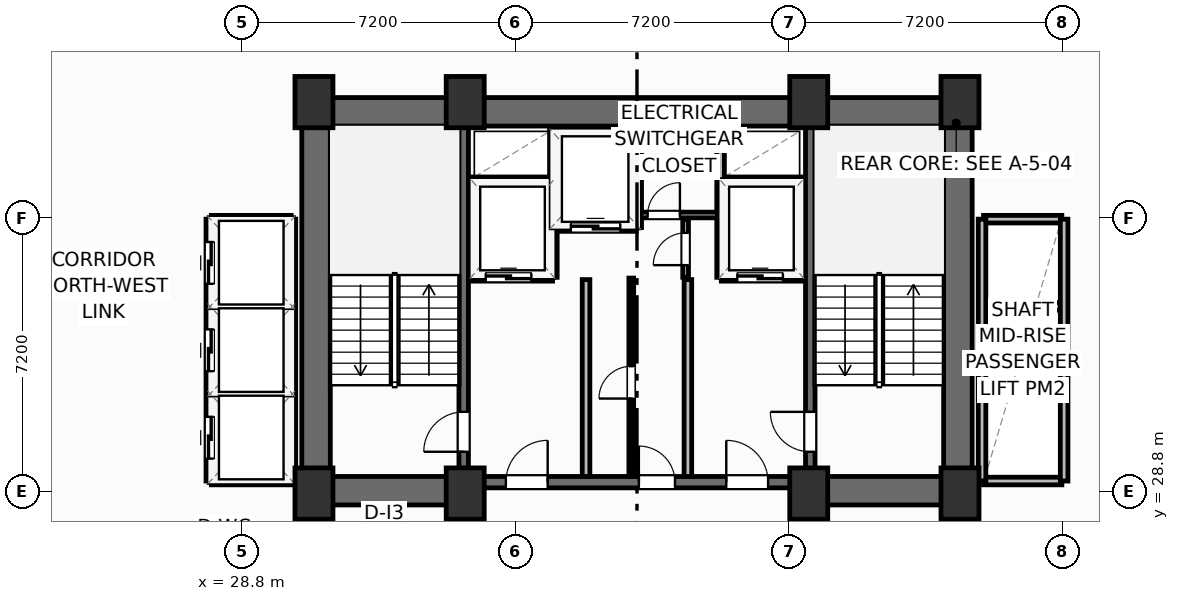
"""IFC4 building model, lengths in metres.
Left out: names, types, materials, properties, quantities, classifications, styles, units other than length and angle.
Written with IfcOpenShell. Run it as: python <this file> out.ifc"""

import sys

from ifc_helpers import new_model, si_unit, direction, frame, frame_2d, origin, origin_2d, place, context, subcontext, project, spatial, rectangle, extrude, element, fill, save


model = new_model("IFC4")
c1 = context("Model", 3, precision=1e-05, world=origin(), true_north=direction((0.0, 1.0)))
c2 = subcontext(c1, "Body", "Model", "MODEL_VIEW")
j1 = project(units=[si_unit("LENGTHUNIT", "METRE"), si_unit("PLANEANGLEUNIT", "RADIAN")], contexts=[c1])
p1 = place(None, origin())
s1 = spatial("IfcSite", under=j1, at=p1, CompositionType="ELEMENT")
p2 = place(p1, origin())
s2 = spatial("IfcBuilding", under=s1, at=p2, CompositionType="ELEMENT")
p3 = place(p2, frame((0.0, 0.0, 83.6)))
s3 = spatial("IfcBuildingStorey", under=s2, at=p3, CompositionType="ELEMENT", Elevation=83.6)
for number, where, z_axis, x_axis in (
    (1, (30.7, 28.75, 0.0), (0.0, 0.0, 1.0), (1.0, 0.0, 0.0)),
    (2, (34.68, 28.75, 0.0), (0.0, 0.0, 1.0), (1.0, 0.0, 0.0)),
    (3, (43.72, 28.75, 0.0), (0.0, 0.0, 1.0), (1.0, 0.0, 0.0)),
    (4, (47.7, 28.75, 0.0), (0.0, 0.0, 1.0), (1.0, 0.0, 0.0)),
    (5, (30.7, 39.05, 0.0), (0.0, 0.0, 1.0), (1.0, 0.0, 0.0)),
    (6, (34.68, 39.05, 0.0), (0.0, 0.0, 1.0), (1.0, 0.0, 0.0)),
    (7, (43.72, 39.05, 0.0), (0.0, 0.0, 1.0), (1.0, 0.0, 0.0)),
    (8, (47.7, 39.05, 0.0), (0.0, 0.0, 1.0), (1.0, 0.0, 0.0)),
):
    element("IfcColumn", number, at=place(p3, frame(where, z_axis=z_axis, x_axis=x_axis)), inside=s3, PredefinedType="COLUMN", context=c2, shape_type="SweptSolid", body=[
        extrude(rectangle(XDim=1.0, YDim=1.35, at=origin_2d()), origin(), (0.0, 0.0, 1.0), 3.7),
    ])
p4 = place(p3, frame((30.38, 38.795, 0.0), z_axis=(0.0, 0.0, 1.0), x_axis=(1.0, 0.0, 0.0)))
e9 = element("IfcWall", 9, at=p4, inside=s3, PredefinedType="SHEAR", context=c2, shape_type="SweptSolid", body=[
    extrude(rectangle(XDim=17.64, YDim=0.75, at=frame_2d((8.82, 0.0))), origin(), (0.0, 0.0, 1.0), 3.45),
])
for number, where, z_axis, x_axis in (
    (10, (30.755, 29.2, 0.0), (0.0, 0.0, 1.0), (0.0, 1.0, 0.0)),
    (11, (47.645, 29.2, 0.0), (0.0, 0.0, 1.0), (0.0, 1.0, 0.0)),
):
    element("IfcWall", number, at=place(p3, frame(where, z_axis=z_axis, x_axis=x_axis)), inside=s3, PredefinedType="SHEAR", context=c2, shape_type="SweptSolid", body=[
        extrude(rectangle(XDim=9.22, YDim=0.75, at=frame_2d((4.61, 0.0))), origin(), (0.0, 0.0, 1.0), 3.45),
    ])
p5 = place(p3, frame((30.38, 28.825, 0.0), z_axis=(0.0, 0.0, 1.0), x_axis=(1.0, 0.0, 0.0)))
e12 = element("IfcWall", 12, at=p5, inside=s3, PredefinedType="SHEAR", context=c2, shape_type="SweptSolid", body=[
    extrude(rectangle(XDim=4.42, YDim=0.75, at=frame_2d((2.21, 0.0))), origin(), (0.0, 0.0, 1.0), 3.45),
])
p6 = place(p3, frame((43.6, 28.825, 0.0), z_axis=(0.0, 0.0, 1.0), x_axis=(1.0, 0.0, 0.0)))
e13 = element("IfcWall", 13, at=p6, inside=s3, PredefinedType="SHEAR", context=c2, shape_type="SweptSolid", body=[
    extrude(rectangle(XDim=4.42, YDim=0.75, at=frame_2d((2.21, 0.0))), origin(), (0.0, 0.0, 1.0), 3.45),
])
p7 = place(p3, frame((34.8, 29.05, 0.0), z_axis=(0.0, 0.0, 1.0), x_axis=(1.0, 0.0, 0.0)))
e14 = element("IfcWall", 14, at=p7, inside=s3, PredefinedType="SHEAR", context=c2, shape_type="SweptSolid", body=[
    extrude(rectangle(XDim=8.8, YDim=0.3, at=frame_2d((4.4, 0.0))), origin(), (0.0, 0.0, 1.0), 3.45),
])
p8 = place(p7, frame((0.95, 0.0, 0.0)))
e15 = element("IfcOpeningElement", 15, at=p8, cuts=e14, PredefinedType="OPENING", context=c2, shape_type="SweptSolid", body=[
    extrude(rectangle(XDim=1.1, YDim=2.15, at=frame_2d((0.55, 1.075))), frame((0.0, 0.16, 0.0), z_axis=(0.0, -1.0, 0.0), x_axis=(1.0, 0.0, 0.0)), (0.0, 0.0, 1.0), 0.32),
])
p9 = place(p7, frame((6.75, 0.0, 0.0)))
e16 = element("IfcOpeningElement", 16, at=p9, cuts=e14, PredefinedType="OPENING", context=c2, shape_type="SweptSolid", body=[
    extrude(rectangle(XDim=1.1, YDim=2.15, at=frame_2d((0.55, 1.075))), frame((0.0, 0.16, 0.0), z_axis=(0.0, -1.0, 0.0), x_axis=(1.0, 0.0, 0.0)), (0.0, 0.0, 1.0), 0.32),
])
p10 = place(p7, frame((4.45, 0.0, 0.0)))
e17 = element("IfcOpeningElement", 17, at=p10, cuts=e14, PredefinedType="OPENING", context=c2, shape_type="SweptSolid", body=[
    extrude(rectangle(XDim=0.95, YDim=2.15, at=frame_2d((0.475, 1.075))), frame((0.0, 0.16, 0.0), z_axis=(0.0, -1.0, 0.0), x_axis=(1.0, 0.0, 0.0)), (0.0, 0.0, 1.0), 0.32),
])
p11 = place(p3, frame((34.64, 29.2, 0.0), z_axis=(0.0, 0.0, 1.0), x_axis=(0.0, 1.0, 0.0)))
e18 = element("IfcWall", 18, at=p11, inside=s3, PredefinedType="SHEAR", context=c2, shape_type="SweptSolid", body=[
    extrude(rectangle(XDim=9.22, YDim=0.25, at=frame_2d((4.61, 0.0))), origin(), (0.0, 0.0, 1.0), 3.45),
])
p12 = place(p11, frame((0.65, 0.0, 0.0)))
e19 = element("IfcOpeningElement", 19, at=p12, cuts=e18, PredefinedType="OPENING", context=c2, shape_type="SweptSolid", body=[
    extrude(rectangle(XDim=1.05, YDim=2.15, at=frame_2d((0.525, 1.075))), frame((0.0, 0.135, 0.0), z_axis=(0.0, -1.0, 0.0), x_axis=(1.0, 0.0, 0.0)), (0.0, 0.0, 1.0), 0.27),
])
p13 = place(p3, frame((43.76, 29.2, 0.0), z_axis=(0.0, 0.0, 1.0), x_axis=(0.0, 1.0, 0.0)))
e20 = element("IfcWall", 20, at=p13, inside=s3, PredefinedType="SHEAR", context=c2, shape_type="SweptSolid", body=[
    extrude(rectangle(XDim=9.22, YDim=0.25, at=frame_2d((4.61, 0.0))), origin(), (0.0, 0.0, 1.0), 3.45),
])
p14 = place(p13, frame((0.65, 0.0, 0.0)))
e21 = element("IfcOpeningElement", 21, at=p14, cuts=e20, PredefinedType="OPENING", context=c2, shape_type="SweptSolid", body=[
    extrude(rectangle(XDim=1.05, YDim=2.15, at=frame_2d((0.525, 1.075))), frame((0.0, 0.135, 0.0), z_axis=(0.0, -1.0, 0.0), x_axis=(1.0, 0.0, 0.0)), (0.0, 0.0, 1.0), 0.27),
])
for number, where, z_axis, x_axis in (
    (22, (37.86, 29.2, 0.0), (0.0, 0.0, 1.0), (0.0, 1.0, 0.0)),
    (23, (40.54, 29.2, 0.0), (0.0, 0.0, 1.0), (0.0, 1.0, 0.0)),
):
    element("IfcWall", number, at=place(p3, frame(where, z_axis=z_axis, x_axis=x_axis)), inside=s3, PredefinedType="PARTITIONING", context=c2, shape_type="SweptSolid", body=[
        extrude(rectangle(XDim=5.18, YDim=0.2, at=frame_2d((2.59, 0.0))), origin(), (0.0, 0.0, 1.0), 3.45),
    ])
p15 = place(p3, frame((34.8, 34.44, 0.0), z_axis=(0.0, 0.0, 1.0), x_axis=(1.0, 0.0, 0.0)))
e24 = element("IfcWall", 24, at=p15, inside=s3, PredefinedType="PARTITIONING", context=c2, shape_type="SweptSolid", body=[
    extrude(rectangle(XDim=2.18, YDim=0.2, at=frame_2d((1.09, 0.0))), origin(), (0.0, 0.0, 1.0), 3.45),
])
p16 = place(p15, frame((0.42, 0.0, 0.0)))
e25 = element("IfcOpeningElement", 25, at=p16, cuts=e24, PredefinedType="OPENING", context=c2, shape_type="SweptSolid", body=[
    extrude(rectangle(XDim=1.2, YDim=2.2, at=frame_2d((0.6, 1.1))), frame((0.0, 0.11, 0.0), z_axis=(0.0, -1.0, 0.0), x_axis=(1.0, 0.0, 0.0)), (0.0, 0.0, 1.0), 0.22),
])
p17 = place(p3, frame((34.8, 36.98, 0.0), z_axis=(0.0, 0.0, 1.0), x_axis=(1.0, 0.0, 0.0)))
e26 = element("IfcWall", 26, at=p17, inside=s3, PredefinedType="PARTITIONING", context=c2, shape_type="SweptSolid", body=[
    extrude(rectangle(XDim=2.18, YDim=0.2, at=frame_2d((1.09, 0.0))), origin(), (0.0, 0.0, 1.0), 3.45),
])
p18 = place(p3, frame((37.0, 34.44, 0.0), z_axis=(0.0, 0.0, 1.0), x_axis=(0.0, 1.0, 0.0)))
e27 = element("IfcWall", 27, at=p18, inside=s3, PredefinedType="PARTITIONING", context=c2, shape_type="SweptSolid", body=[
    extrude(rectangle(XDim=3.9, YDim=0.2, at=frame_2d((1.95, 0.0))), origin(), (0.0, 0.0, 1.0), 3.45),
])
p19 = place(p3, frame((41.42, 34.44, 0.0), z_axis=(0.0, 0.0, 1.0), x_axis=(1.0, 0.0, 0.0)))
e28 = element("IfcWall", 28, at=p19, inside=s3, PredefinedType="PARTITIONING", context=c2, shape_type="SweptSolid", body=[
    extrude(rectangle(XDim=2.18, YDim=0.2, at=frame_2d((1.09, 0.0))), origin(), (0.0, 0.0, 1.0), 3.45),
])
p20 = place(p19, frame((0.42, 0.0, 0.0)))
e29 = element("IfcOpeningElement", 29, at=p20, cuts=e28, PredefinedType="OPENING", context=c2, shape_type="SweptSolid", body=[
    extrude(rectangle(XDim=1.2, YDim=2.2, at=frame_2d((0.6, 1.1))), frame((0.0, 0.11, 0.0), z_axis=(0.0, -1.0, 0.0), x_axis=(1.0, 0.0, 0.0)), (0.0, 0.0, 1.0), 0.22),
])
p21 = place(p3, frame((41.42, 36.98, 0.0), z_axis=(0.0, 0.0, 1.0), x_axis=(1.0, 0.0, 0.0)))
e30 = element("IfcWall", 30, at=p21, inside=s3, PredefinedType="PARTITIONING", context=c2, shape_type="SweptSolid", body=[
    extrude(rectangle(XDim=2.18, YDim=0.2, at=frame_2d((1.09, 0.0))), origin(), (0.0, 0.0, 1.0), 3.45),
])
p22 = place(p3, frame((41.4, 34.44, 0.0), z_axis=(0.0, 0.0, 1.0), x_axis=(0.0, 1.0, 0.0)))
e31 = element("IfcWall", 31, at=p22, inside=s3, PredefinedType="PARTITIONING", context=c2, shape_type="SweptSolid", body=[
    extrude(rectangle(XDim=3.9, YDim=0.2, at=frame_2d((1.95, 0.0))), origin(), (0.0, 0.0, 1.0), 3.45),
])
p23 = place(p3, frame((37.06, 35.75, 0.0), z_axis=(0.0, 0.0, 1.0), x_axis=(1.0, 0.0, 0.0)))
e32 = element("IfcWall", 32, at=p23, inside=s3, PredefinedType="PARTITIONING", context=c2, shape_type="SweptSolid", body=[
    extrude(rectangle(XDim=2.12, YDim=0.2, at=frame_2d((1.06, 0.0))), origin(), (0.0, 0.0, 1.0), 3.45),
])
p24 = place(p23, frame((0.4, 0.0, 0.0)))
e33 = element("IfcOpeningElement", 33, at=p24, cuts=e32, PredefinedType="OPENING", context=c2, shape_type="SweptSolid", body=[
    extrude(rectangle(XDim=1.3, YDim=2.2, at=frame_2d((0.65, 1.1))), frame((0.0, 0.11, 0.0), z_axis=(0.0, -1.0, 0.0), x_axis=(1.0, 0.0, 0.0)), (0.0, 0.0, 1.0), 0.22),
])
p25 = place(p3, frame((39.22, 35.75, 0.0), z_axis=(0.0, 0.0, 1.0), x_axis=(0.0, 1.0, 0.0)))
e34 = element("IfcWall", 34, at=p25, inside=s3, PredefinedType="PARTITIONING", context=c2, shape_type="SweptSolid", body=[
    extrude(rectangle(XDim=2.59, YDim=0.2, at=frame_2d((1.295, 0.0))), origin(), (0.0, 0.0, 1.0), 3.45),
])
p26 = place(p3, frame((39.3, 36.08, 0.0), z_axis=(0.0, 0.0, 1.0), x_axis=(1.0, 0.0, 0.0)))
e35 = element("IfcWall", 35, at=p26, inside=s3, PredefinedType="PARTITIONING", context=c2, shape_type="SweptSolid", body=[
    extrude(rectangle(XDim=2.02, YDim=0.15, at=frame_2d((1.01, 0.0))), origin(), (0.0, 0.0, 1.0), 3.45),
])
p27 = place(p26, frame((0.18, 0.0, 0.0)))
e36 = element("IfcOpeningElement", 36, at=p27, cuts=e35, PredefinedType="OPENING", context=c2, shape_type="SweptSolid", body=[
    extrude(rectangle(XDim=0.85, YDim=2.05, at=frame_2d((0.425, 1.025))), frame((0.0, 0.085, 0.0), z_axis=(0.0, -1.0, 0.0), x_axis=(1.0, 0.0, 0.0)), (0.0, 0.0, 1.0), 0.17),
])
p28 = place(p3, frame((40.48, 34.44, 0.0), z_axis=(0.0, 0.0, 1.0), x_axis=(0.0, 1.0, 0.0)))
e37 = element("IfcWall", 37, at=p28, inside=s3, PredefinedType="PARTITIONING", context=c2, shape_type="SweptSolid", body=[
    extrude(rectangle(XDim=1.52, YDim=0.15, at=frame_2d((0.76, 0.0))), origin(), (0.0, 0.0, 1.0), 3.45),
])
p29 = place(p28, frame((0.32, 0.0, 0.0)))
e38 = element("IfcOpeningElement", 38, at=p29, cuts=e37, PredefinedType="OPENING", context=c2, shape_type="SweptSolid", body=[
    extrude(rectangle(XDim=0.85, YDim=2.05, at=frame_2d((0.425, 1.025))), frame((0.0, 0.085, 0.0), z_axis=(0.0, -1.0, 0.0), x_axis=(1.0, 0.0, 0.0)), (0.0, 0.0, 1.0), 0.17),
])
p30 = place(p3, frame((39.05, 29.2, 0.0), z_axis=(0.0, 0.0, 1.0), x_axis=(0.0, 1.0, 0.0)))
e39 = element("IfcWall", 39, at=p30, inside=s3, PredefinedType="PARTITIONING", context=c2, shape_type="SweptSolid", body=[
    extrude(rectangle(XDim=5.22, YDim=0.125, at=frame_2d((2.61, 0.0))), origin(), (0.0, 0.0, 1.0), 3.45),
])
p31 = place(p30, frame((2.05, 0.0, 0.0)))
e40 = element("IfcOpeningElement", 40, at=p31, cuts=e39, PredefinedType="OPENING", context=c2, shape_type="SweptSolid", body=[
    extrude(rectangle(XDim=0.85, YDim=2.05, at=frame_2d((0.425, 1.025))), frame((0.0, 0.073, 0.0), z_axis=(0.0, -1.0, 0.0), x_axis=(1.0, 0.0, 0.0)), (0.0, 0.0, 1.0), 0.145),
])
for number, where, z_axis, x_axis in (
    (41, (28.02, 31.375, 0.0), (0.0, 0.0, 1.0), (1.0, 0.0, 0.0)),
    (42, (28.02, 33.675, 0.0), (0.0, 0.0, 1.0), (1.0, 0.0, 0.0)),
):
    element("IfcWall", number, at=place(p3, frame(where, z_axis=z_axis, x_axis=x_axis)), inside=s3, PredefinedType="PARTITIONING", context=c2, shape_type="SweptSolid", body=[
        extrude(rectangle(XDim=2.06, YDim=0.2, at=frame_2d((1.03, 0.0))), origin(), (0.0, 0.0, 1.0), 3.45),
    ])
for number, where, z_axis, x_axis in (
    (43, (28.0, 29.08, 0.0), (0.0, 0.0, 1.0), (1.0, 0.0, 0.0)),
    (44, (28.0, 35.97, 0.0), (0.0, 0.0, 1.0), (1.0, 0.0, 0.0)),
):
    element("IfcWall", number, at=place(p3, frame(where, z_axis=z_axis, x_axis=x_axis)), inside=s3, PredefinedType="PARTITIONING", context=c2, shape_type="SweptSolid", body=[
        extrude(rectangle(XDim=2.1, YDim=0.2, at=frame_2d((1.05, 0.0))), origin(), (0.0, 0.0, 1.0), 3.45),
    ])
p32 = place(p3, frame((30.12, 29.08, 0.0), z_axis=(0.0, 0.0, 1.0), x_axis=(0.0, 1.0, 0.0)))
e45 = element("IfcWall", 45, at=p32, inside=s3, PredefinedType="PARTITIONING", context=c2, shape_type="SweptSolid", body=[
    extrude(rectangle(XDim=6.89, YDim=0.2, at=frame_2d((3.445, 0.0))), origin(), (0.0, 0.0, 1.0), 3.45),
])
p33 = place(p3, frame((27.96, 29.08, 0.0), z_axis=(0.0, 0.0, 1.0), x_axis=(0.0, 1.0, 0.0)))
e46 = element("IfcWall", 46, at=p33, inside=s3, PredefinedType="PARTITIONING", context=c2, shape_type="SweptSolid", body=[
    extrude(rectangle(XDim=6.89, YDim=0.2, at=frame_2d((3.445, 0.0))), origin(), (0.0, 0.0, 1.0), 3.45),
])
p34 = place(p33, frame((0.59, 0.0, 0.0)))
e47 = element("IfcOpeningElement", 47, at=p34, cuts=e46, PredefinedType="OPENING", context=c2, shape_type="SweptSolid", body=[
    extrude(rectangle(XDim=1.1, YDim=2.15, at=frame_2d((0.55, 1.075))), frame((0.0, 0.11, 0.0), z_axis=(0.0, -1.0, 0.0), x_axis=(1.0, 0.0, 0.0)), (0.0, 0.0, 1.0), 0.22),
])
p35 = place(p33, frame((2.89, 0.0, 0.0)))
e48 = element("IfcOpeningElement", 48, at=p35, cuts=e46, PredefinedType="OPENING", context=c2, shape_type="SweptSolid", body=[
    extrude(rectangle(XDim=1.1, YDim=2.15, at=frame_2d((0.55, 1.075))), frame((0.0, 0.11, 0.0), z_axis=(0.0, -1.0, 0.0), x_axis=(1.0, 0.0, 0.0)), (0.0, 0.0, 1.0), 0.22),
])
p36 = place(p33, frame((5.19, 0.0, 0.0)))
e49 = element("IfcOpeningElement", 49, at=p36, cuts=e46, PredefinedType="OPENING", context=c2, shape_type="SweptSolid", body=[
    extrude(rectangle(XDim=1.1, YDim=2.15, at=frame_2d((0.55, 1.075))), frame((0.0, 0.11, 0.0), z_axis=(0.0, -1.0, 0.0), x_axis=(1.0, 0.0, 0.0)), (0.0, 0.0, 1.0), 0.22),
])
for number, where, z_axis, x_axis in (
    (50, (48.32, 31.375, 0.0), (0.0, 0.0, 1.0), (1.0, 0.0, 0.0)),
    (51, (48.32, 33.675, 0.0), (0.0, 0.0, 1.0), (1.0, 0.0, 0.0)),
):
    element("IfcWall", number, at=place(p3, frame(where, z_axis=z_axis, x_axis=x_axis)), inside=s3, PredefinedType="PARTITIONING", context=c2, shape_type="SweptSolid", body=[
        extrude(rectangle(XDim=2.06, YDim=0.2, at=frame_2d((1.03, 0.0))), origin(), (0.0, 0.0, 1.0), 3.45),
    ])
p37 = place(p3, frame((48.32, 29.08, 0.0), z_axis=(0.0, 0.0, 1.0), x_axis=(1.0, 0.0, 0.0)))
e52 = element("IfcWall", 52, at=p37, inside=s3, PredefinedType="PARTITIONING", context=c2, shape_type="SweptSolid", body=[
    extrude(rectangle(XDim=2.06, YDim=0.2, at=frame_2d((1.03, 0.0))), origin(), (0.0, 0.0, 1.0), 2.662),
])
p38 = place(p3, frame((48.32, 35.97, 0.0), z_axis=(0.0, 0.0, 1.0), x_axis=(1.0, 0.0, 0.0)))
e53 = element("IfcWall", 53, at=p38, inside=s3, PredefinedType="PARTITIONING", context=c2, shape_type="SweptSolid", body=[
    extrude(rectangle(XDim=2.06, YDim=0.2, at=frame_2d((1.03, 0.0))), origin(), (0.0, 0.0, 1.0), 3.45),
])
for number, where, z_axis, x_axis in (
    (54, (48.28, 29.08, 0.0), (0.0, 0.0, 1.0), (0.0, 1.0, 0.0)),
    (55, (50.44, 29.08, 0.0), (0.0, 0.0, 1.0), (0.0, 1.0, 0.0)),
):
    element("IfcWall", number, at=place(p3, frame(where, z_axis=z_axis, x_axis=x_axis)), inside=s3, PredefinedType="PARTITIONING", context=c2, shape_type="SweptSolid", body=[
        extrude(rectangle(XDim=6.89, YDim=0.2, at=frame_2d((3.445, 0.0))), origin(), (0.0, 0.0, 1.0), 3.45),
    ])
p39 = place(p12, origin())
e56 = element("IfcDoor", 56, at=p39, inside=s3, OperationType="SINGLE_SWING_LEFT", PredefinedType="DOOR", context=c2, shape_type="SweptSolid", body=[
    extrude(rectangle(XDim=1.05, YDim=2.15, at=frame_2d((0.525, 1.075))), frame((0.0, 0.025, 0.0), z_axis=(0.0, -1.0, 0.0), x_axis=(1.0, 0.0, 0.0)), (0.0, 0.0, 1.0), 0.05),
])
fill(e19, e56)
p40 = place(p14, origin())
e57 = element("IfcDoor", 57, at=p40, inside=s3, OperationType="SINGLE_SWING_RIGHT", PredefinedType="DOOR", context=c2, shape_type="SweptSolid", body=[
    extrude(rectangle(XDim=1.05, YDim=2.15, at=frame_2d((0.525, 1.075))), frame((0.0, 0.025, 0.0), z_axis=(0.0, -1.0, 0.0), x_axis=(1.0, 0.0, 0.0)), (0.0, 0.0, 1.0), 0.05),
])
fill(e21, e57)
p41 = place(p8, origin())
e58 = element("IfcDoor", 58, at=p41, inside=s3, OperationType="SINGLE_SWING_RIGHT", PredefinedType="DOOR", context=c2, shape_type="SweptSolid", body=[
    extrude(rectangle(XDim=1.1, YDim=2.15, at=frame_2d((0.55, 1.075))), frame((0.0, 0.025, 0.0), z_axis=(0.0, -1.0, 0.0), x_axis=(1.0, 0.0, 0.0)), (0.0, 0.0, 1.0), 0.05),
])
fill(e15, e58)
p42 = place(p9, origin())
e59 = element("IfcDoor", 59, at=p42, inside=s3, OperationType="SINGLE_SWING_LEFT", PredefinedType="DOOR", context=c2, shape_type="SweptSolid", body=[
    extrude(rectangle(XDim=1.1, YDim=2.15, at=frame_2d((0.55, 1.075))), frame((0.0, 0.025, 0.0), z_axis=(0.0, -1.0, 0.0), x_axis=(1.0, 0.0, 0.0)), (0.0, 0.0, 1.0), 0.05),
])
fill(e16, e59)
p43 = place(p16, origin())
e60 = element("IfcDoor", 60, at=p43, inside=s3, OperationType="SLIDING_TO_LEFT", PredefinedType="DOOR", context=c2, shape_type="SweptSolid", body=[
    extrude(rectangle(XDim=1.2, YDim=2.2, at=frame_2d((0.6, 1.1))), frame((0.0, 0.025, 0.0), z_axis=(0.0, -1.0, 0.0), x_axis=(1.0, 0.0, 0.0)), (0.0, 0.0, 1.0), 0.05),
])
fill(e25, e60)
p44 = place(p20, origin())
e61 = element("IfcDoor", 61, at=p44, inside=s3, OperationType="SLIDING_TO_LEFT", PredefinedType="DOOR", context=c2, shape_type="SweptSolid", body=[
    extrude(rectangle(XDim=1.2, YDim=2.2, at=frame_2d((0.6, 1.1))), frame((0.0, 0.025, 0.0), z_axis=(0.0, -1.0, 0.0), x_axis=(1.0, 0.0, 0.0)), (0.0, 0.0, 1.0), 0.05),
])
fill(e29, e61)
p45 = place(p24, origin())
e62 = element("IfcDoor", 62, at=p45, inside=s3, OperationType="SLIDING_TO_LEFT", PredefinedType="DOOR", context=c2, shape_type="SweptSolid", body=[
    extrude(rectangle(XDim=1.3, YDim=2.2, at=frame_2d((0.65, 1.1))), frame((0.0, 0.025, 0.0), z_axis=(0.0, -1.0, 0.0), x_axis=(1.0, 0.0, 0.0)), (0.0, 0.0, 1.0), 0.05),
])
fill(e33, e62)
p46 = place(p27, origin())
e63 = element("IfcDoor", 63, at=p46, inside=s3, OperationType="SINGLE_SWING_RIGHT", PredefinedType="DOOR", context=c2, shape_type="SweptSolid", body=[
    extrude(rectangle(XDim=0.85, YDim=2.05, at=frame_2d((0.425, 1.025))), frame((0.0, 0.025, 0.0), z_axis=(0.0, -1.0, 0.0), x_axis=(1.0, 0.0, 0.0)), (0.0, 0.0, 1.0), 0.05),
])
fill(e36, e63)
p47 = place(p29, origin())
e64 = element("IfcDoor", 64, at=p47, inside=s3, OperationType="SINGLE_SWING_LEFT", PredefinedType="DOOR", context=c2, shape_type="SweptSolid", body=[
    extrude(rectangle(XDim=0.85, YDim=2.05, at=frame_2d((0.425, 1.025))), frame((0.0, 0.025, 0.0), z_axis=(0.0, -1.0, 0.0), x_axis=(1.0, 0.0, 0.0)), (0.0, 0.0, 1.0), 0.05),
])
fill(e38, e64)
p48 = place(p31, origin())
e65 = element("IfcDoor", 65, at=p48, inside=s3, OperationType="SINGLE_SWING_LEFT", PredefinedType="DOOR", context=c2, shape_type="SweptSolid", body=[
    extrude(rectangle(XDim=0.85, YDim=2.05, at=frame_2d((0.425, 1.025))), frame((0.0, 0.025, 0.0), z_axis=(0.0, -1.0, 0.0), x_axis=(1.0, 0.0, 0.0)), (0.0, 0.0, 1.0), 0.05),
])
fill(e40, e65)
p49 = place(p10, origin())
e66 = element("IfcDoor", 66, at=p49, inside=s3, OperationType="SINGLE_SWING_LEFT", PredefinedType="DOOR", context=c2, shape_type="SweptSolid", body=[
    extrude(rectangle(XDim=0.95, YDim=2.15, at=frame_2d((0.475, 1.075))), frame((0.0, 0.025, 0.0), z_axis=(0.0, -1.0, 0.0), x_axis=(1.0, 0.0, 0.0)), (0.0, 0.0, 1.0), 0.05),
])
fill(e17, e66)
p50 = place(p34, origin())
e67 = element("IfcDoor", 67, at=p50, inside=s3, OperationType="SLIDING_TO_LEFT", PredefinedType="DOOR", context=c2, shape_type="SweptSolid", body=[
    extrude(rectangle(XDim=1.1, YDim=2.15, at=frame_2d((0.55, 1.075))), frame((0.0, 0.025, 0.0), z_axis=(0.0, -1.0, 0.0), x_axis=(1.0, 0.0, 0.0)), (0.0, 0.0, 1.0), 0.05),
])
fill(e47, e67)
p51 = place(p35, origin())
e68 = element("IfcDoor", 68, at=p51, inside=s3, OperationType="SLIDING_TO_LEFT", PredefinedType="DOOR", context=c2, shape_type="SweptSolid", body=[
    extrude(rectangle(XDim=1.1, YDim=2.15, at=frame_2d((0.55, 1.075))), frame((0.0, 0.025, 0.0), z_axis=(0.0, -1.0, 0.0), x_axis=(1.0, 0.0, 0.0)), (0.0, 0.0, 1.0), 0.05),
])
fill(e48, e68)
p52 = place(p36, origin())
e69 = element("IfcDoor", 69, at=p52, inside=s3, OperationType="SLIDING_TO_LEFT", PredefinedType="DOOR", context=c2, shape_type="SweptSolid", body=[
    extrude(rectangle(XDim=1.1, YDim=2.15, at=frame_2d((0.55, 1.075))), frame((0.0, 0.025, 0.0), z_axis=(0.0, -1.0, 0.0), x_axis=(1.0, 0.0, 0.0)), (0.0, 0.0, 1.0), 0.05),
])
fill(e49, e69)
save(model, sys.argv[1])
